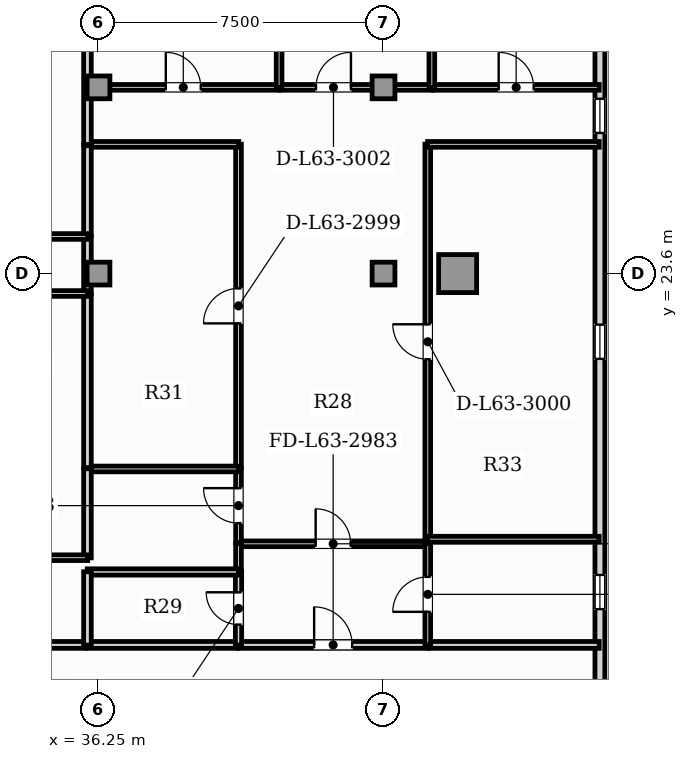
"""IFC4 building model, lengths in metres.
Left out: names, types, materials, properties, quantities, classifications, styles, units other than length and angle.
Written with IfcOpenShell. Run it as: python <this file> out.ifc"""

import sys

from ifc_helpers import new_model, si_unit, direction, frame, frame_2d, origin, origin_2d, place, context, subcontext, project, spatial, rectangle, hollow_rectangle, extrude, element, fill, save


model = new_model("IFC4")
c1 = context("Model", 3, precision=1e-05, world=origin(), true_north=direction((0.0, 1.0)))
c2 = subcontext(c1, "Body", "Model", "MODEL_VIEW")
j1 = project(units=[si_unit("LENGTHUNIT", "METRE"), si_unit("PLANEANGLEUNIT", "RADIAN")], contexts=[c1])
p1 = place(None, origin())
s1 = spatial("IfcSite", under=j1, at=p1, CompositionType="ELEMENT")
p2 = place(p1, origin())
s2 = spatial("IfcBuilding", under=s1, at=p2, CompositionType="ELEMENT")
p3 = place(p2, frame((0.0, 0.0, 256.75)))
s3 = spatial("IfcBuildingStorey", under=s2, at=p3, CompositionType="ELEMENT", Elevation=256.75)
p4 = place(p3, frame((45.7, 23.6, 0.0), z_axis=(0.0, 0.0, 1.0), x_axis=(1.0, 0.0, 0.0)))
e1 = element("IfcColumn", 1, at=p4, inside=s3, PredefinedType="USERDEFINED", context=c2, shape_type="SweptSolid", body=[
    extrude(hollow_rectangle(XDim=1.0, YDim=1.0, WallThickness=0.06, at=origin_2d()), origin(), (0.0, 0.0, 1.0), 3.85),
])
for number, where, z_axis, x_axis in (
    (2, (36.25, 23.6, 0.0), (0.0, 0.0, 1.0), (1.0, 0.0, 0.0)),
    (3, (43.75, 23.6, 0.0), (0.0, 0.0, 1.0), (1.0, 0.0, 0.0)),
    (4, (36.25, 28.5, 0.0), (0.0, 0.0, 1.0), (1.0, 0.0, 0.0)),
    (5, (43.75, 28.5, 0.0), (0.0, 0.0, 1.0), (1.0, 0.0, 0.0)),
):
    element("IfcColumn", number, at=place(p3, frame(where, z_axis=z_axis, x_axis=x_axis)), inside=s3, PredefinedType="COLUMN", context=c2, shape_type="SweptSolid", body=[
        extrude(rectangle(XDim=0.6, YDim=0.6, at=origin_2d()), origin(), (0.0, 0.0, 1.0), 3.85),
    ])
p5 = place(p3, frame((49.443, 3.24, 0.0), z_axis=(0.0, 0.0, 1.0), x_axis=(0.0, 1.0, 0.0)))
e6 = element("IfcWall", 6, at=p5, inside=s3, PredefinedType="SOLIDWALL", context=c2, shape_type="SweptSolid", body=[
    extrude(rectangle(XDim=29.486, YDim=0.26, at=frame_2d((14.743, 0.0))), origin(), (0.0, 0.0, 1.0), 3.19),
])
p6 = place(p5, frame((24.06, 0.0, 0.85)))
e7 = element("IfcOpeningElement", 7, at=p6, cuts=e6, PredefinedType="OPENING", context=c2, shape_type="SweptSolid", body=[
    extrude(rectangle(XDim=0.9, YDim=1.4, at=frame_2d((0.45, 0.7))), frame((0.0, 0.14, 0.0), z_axis=(0.0, -1.0, 0.0), x_axis=(1.0, 0.0, 0.0)), (0.0, 0.0, 1.0), 0.28),
])
p7 = place(p5, frame((11.531, 0.0, 0.85)))
e8 = element("IfcOpeningElement", 8, at=p7, cuts=e6, PredefinedType="OPENING", context=c2, shape_type="SweptSolid", body=[
    extrude(rectangle(XDim=0.9, YDim=1.4, at=frame_2d((0.45, 0.7))), frame((0.0, 0.14, 0.0), z_axis=(0.0, -1.0, 0.0), x_axis=(1.0, 0.0, 0.0)), (0.0, 0.0, 1.0), 0.28),
])
p8 = place(p5, frame((18.116, 0.0, 0.85)))
e9 = element("IfcOpeningElement", 9, at=p8, cuts=e6, PredefinedType="OPENING", context=c2, shape_type="SweptSolid", body=[
    extrude(rectangle(XDim=0.9, YDim=1.4, at=frame_2d((0.45, 0.7))), frame((0.0, 0.14, 0.0), z_axis=(0.0, -1.0, 0.0), x_axis=(1.0, 0.0, 0.0)), (0.0, 0.0, 1.0), 0.28),
])
p9 = place(p5, frame((26.258, 0.0, 0.85)))
e10 = element("IfcOpeningElement", 10, at=p9, cuts=e6, PredefinedType="OPENING", context=c2, shape_type="SweptSolid", body=[
    extrude(rectangle(XDim=0.9, YDim=1.4, at=frame_2d((0.45, 0.7))), frame((0.0, 0.14, 0.0), z_axis=(0.0, -1.0, 0.0), x_axis=(1.0, 0.0, 0.0)), (0.0, 0.0, 1.0), 0.28),
])
p10 = place(p3, frame((39.929, 13.83, 0.0), z_axis=(0.0, 0.0, 1.0), x_axis=(1.0, 0.0, 0.0)))
e11 = element("IfcWall", 11, at=p10, inside=s3, PredefinedType="PARTITIONING", context=c2, shape_type="SweptSolid", body=[
    extrude(rectangle(XDim=4.99, YDim=0.18, at=frame_2d((2.495, 0.0))), origin(), (0.0, 0.0, 1.0), 3.65),
])
p11 = place(p10, frame((1.995, 0.0, 0.0)))
e12 = element("IfcOpeningElement", 12, at=p11, cuts=e11, PredefinedType="OPENING", context=c2, shape_type="SweptSolid", body=[
    extrude(rectangle(XDim=1.0, YDim=2.15, at=frame_2d((0.5, 1.075))), frame((0.0, 0.1, 0.0), z_axis=(0.0, -1.0, 0.0), x_axis=(1.0, 0.0, 0.0)), (0.0, 0.0, 1.0), 0.2),
])
p12 = place(p3, frame((35.955, 13.83, 0.0), z_axis=(0.0, 0.0, 1.0), x_axis=(1.0, 0.0, 0.0)))
e13 = element("IfcWall", 13, at=p12, inside=s3, PredefinedType="PARTITIONING", context=c2, shape_type="SweptSolid", body=[
    extrude(rectangle(XDim=3.944, YDim=0.18, at=frame_2d((1.972, 0.0))), origin(), (0.0, 0.0, 1.0), 3.65),
])
p13 = place(p3, frame((44.949, 13.83, 0.0), z_axis=(0.0, 0.0, 1.0), x_axis=(1.0, 0.0, 0.0)))
e14 = element("IfcWall", 14, at=p13, inside=s3, PredefinedType="PARTITIONING", context=c2, shape_type="SweptSolid", body=[
    extrude(rectangle(XDim=4.475, YDim=0.18, at=frame_2d((2.237, 0.0))), origin(), (0.0, 0.0, 1.0), 3.65),
])
p14 = place(p3, frame((31.275, 13.83, 0.0), z_axis=(0.0, 0.0, 1.0), x_axis=(1.0, 0.0, 0.0)))
e15 = element("IfcWall", 15, at=p14, inside=s3, PredefinedType="PARTITIONING", context=c2, shape_type="SweptSolid", body=[
    extrude(rectangle(XDim=4.65, YDim=0.18, at=frame_2d((2.325, 0.0))), origin(), (0.0, 0.0, 1.0), 3.65),
])
p15 = place(p3, frame((39.929, 16.49, 0.0), z_axis=(0.0, 0.0, 1.0), x_axis=(1.0, 0.0, 0.0)))
e16 = element("IfcWall", 16, at=p15, inside=s3, PredefinedType="PARTITIONING", context=c2, shape_type="SweptSolid", body=[
    extrude(rectangle(XDim=4.99, YDim=0.15, at=frame_2d((2.495, 0.0))), origin(), (0.0, 0.0, 1.0), 3.65),
])
p16 = place(p15, frame((2.035, 0.0, 0.0)))
e17 = element("IfcOpeningElement", 17, at=p16, cuts=e16, PredefinedType="OPENING", context=c2, shape_type="SweptSolid", body=[
    extrude(rectangle(XDim=0.92, YDim=2.1, at=frame_2d((0.46, 1.05))), frame((0.0, 0.085, 0.0), z_axis=(0.0, -1.0, 0.0), x_axis=(1.0, 0.0, 0.0)), (0.0, 0.0, 1.0), 0.17),
])
p17 = place(p3, frame((39.934, 13.825, 0.0), z_axis=(0.0, 0.0, 1.0), x_axis=(0.0, 1.0, 0.0)))
e18 = element("IfcWall", 18, at=p17, inside=s3, PredefinedType="PLUMBINGWALL", context=c2, shape_type="SweptSolid", body=[
    extrude(rectangle(XDim=1.929, YDim=0.165, at=frame_2d((0.965, 0.0))), origin(), (0.0, 0.0, 1.0), 3.65),
])
p18 = place(p17, frame((0.54, 0.0, 0.0)))
e19 = element("IfcOpeningElement", 19, at=p18, cuts=e18, PredefinedType="OPENING", context=c2, shape_type="SweptSolid", body=[
    extrude(rectangle(XDim=0.85, YDim=2.1, at=frame_2d((0.425, 1.05))), frame((0.0, 0.093, 0.0), z_axis=(0.0, -1.0, 0.0), x_axis=(1.0, 0.0, 0.0)), (0.0, 0.0, 1.0), 0.185),
])
p19 = place(p3, frame((39.934, 15.784, 0.0), z_axis=(0.0, 0.0, 1.0), x_axis=(0.0, 1.0, 0.0)))
e20 = element("IfcWall", 20, at=p19, inside=s3, PredefinedType="PARTITIONING", context=c2, shape_type="SweptSolid", body=[
    extrude(rectangle(XDim=0.711, YDim=0.15, at=frame_2d((0.355, 0.0))), origin(), (0.0, 0.0, 1.0), 3.65),
])
p20 = place(p3, frame((44.914, 13.825, 0.0), z_axis=(0.0, 0.0, 1.0), x_axis=(0.0, 1.0, 0.0)))
e21 = element("IfcWall", 21, at=p20, inside=s3, PredefinedType="PARTITIONING", context=c2, shape_type="SweptSolid", body=[
    extrude(rectangle(XDim=2.67, YDim=0.15, at=frame_2d((1.335, 0.0))), origin(), (0.0, 0.0, 1.0), 3.65),
])
p21 = place(p20, frame((0.875, 0.0, 0.0)))
e22 = element("IfcOpeningElement", 22, at=p21, cuts=e21, PredefinedType="OPENING", context=c2, shape_type="SweptSolid", body=[
    extrude(rectangle(XDim=0.92, YDim=2.1, at=frame_2d((0.46, 1.05))), frame((0.0, 0.085, 0.0), z_axis=(0.0, -1.0, 0.0), x_axis=(1.0, 0.0, 0.0)), (0.0, 0.0, 1.0), 0.17),
])
p22 = place(p3, frame((39.934, 16.525, 0.0), z_axis=(0.0, 0.0, 1.0), x_axis=(0.0, 1.0, 0.0)))
e23 = element("IfcWall", 23, at=p22, inside=s3, PredefinedType="PARTITIONING", context=c2, shape_type="SweptSolid", body=[
    extrude(rectangle(XDim=1.939, YDim=0.15, at=frame_2d((0.97, 0.0))), origin(), (0.0, 0.0, 1.0), 3.65),
])
p23 = place(p22, frame((0.51, 0.0, 0.0)))
e24 = element("IfcOpeningElement", 24, at=p23, cuts=e23, PredefinedType="OPENING", context=c2, shape_type="SweptSolid", body=[
    extrude(rectangle(XDim=0.92, YDim=2.1, at=frame_2d((0.46, 1.05))), frame((0.0, 0.085, 0.0), z_axis=(0.0, -1.0, 0.0), x_axis=(1.0, 0.0, 0.0)), (0.0, 0.0, 1.0), 0.17),
])
p24 = place(p3, frame((39.934, 18.495, 0.0), z_axis=(0.0, 0.0, 1.0), x_axis=(0.0, 1.0, 0.0)))
e25 = element("IfcWall", 25, at=p24, inside=s3, PredefinedType="PARTITIONING", context=c2, shape_type="SweptSolid", body=[
    extrude(rectangle(XDim=8.51, YDim=0.15, at=frame_2d((4.255, 0.0))), origin(), (0.0, 0.0, 1.0), 3.65),
])
p25 = place(p24, frame((3.795, 0.0, 0.0)))
e26 = element("IfcOpeningElement", 26, at=p25, cuts=e25, PredefinedType="OPENING", context=c2, shape_type="SweptSolid", body=[
    extrude(rectangle(XDim=0.92, YDim=2.1, at=frame_2d((0.46, 1.05))), frame((0.0, 0.085, 0.0), z_axis=(0.0, -1.0, 0.0), x_axis=(1.0, 0.0, 0.0)), (0.0, 0.0, 1.0), 0.17),
])
p26 = place(p3, frame((35.955, 27.0, 0.0), z_axis=(0.0, 0.0, 1.0), x_axis=(1.0, 0.0, 0.0)))
e27 = element("IfcWall", 27, at=p26, inside=s3, PredefinedType="PARTITIONING", context=c2, shape_type="SweptSolid", body=[
    extrude(rectangle(XDim=3.984, YDim=0.15, at=frame_2d((1.992, 0.0))), origin(), (0.0, 0.0, 1.0), 3.65),
])
p27 = place(p3, frame((44.914, 16.607, 0.0), z_axis=(0.0, 0.0, 1.0), x_axis=(0.0, 1.0, 0.0)))
e28 = element("IfcWall", 28, at=p27, inside=s3, PredefinedType="PARTITIONING", context=c2, shape_type="SweptSolid", body=[
    extrude(rectangle(XDim=10.397, YDim=0.15, at=frame_2d((5.199, 0.0))), origin(), (0.0, 0.0, 1.0), 3.65),
])
p28 = place(p27, frame((4.739, 0.0, 0.0)))
e29 = element("IfcOpeningElement", 29, at=p28, cuts=e28, PredefinedType="OPENING", context=c2, shape_type="SweptSolid", body=[
    extrude(rectangle(XDim=0.92, YDim=2.1, at=frame_2d((0.46, 1.05))), frame((0.0, 0.085, 0.0), z_axis=(0.0, -1.0, 0.0), x_axis=(1.0, 0.0, 0.0)), (0.0, 0.0, 1.0), 0.17),
])
p29 = place(p3, frame((44.909, 27.0, 0.0), z_axis=(0.0, 0.0, 1.0), x_axis=(1.0, 0.0, 0.0)))
e30 = element("IfcWall", 30, at=p29, inside=s3, PredefinedType="PARTITIONING", context=c2, shape_type="SweptSolid", body=[
    extrude(rectangle(XDim=4.515, YDim=0.15, at=frame_2d((2.257, 0.0))), origin(), (0.0, 0.0, 1.0), 3.65),
])
p30 = place(p3, frame((35.955, 28.5, 0.0), z_axis=(0.0, 0.0, 1.0), x_axis=(1.0, 0.0, 0.0)))
e31 = element("IfcWall", 31, at=p30, inside=s3, PredefinedType="PARTITIONING", context=c2, shape_type="SweptSolid", body=[
    extrude(rectangle(XDim=5.052, YDim=0.15, at=frame_2d((2.526, 0.0))), origin(), (0.0, 0.0, 1.0), 3.105),
])
p31 = place(p30, frame((2.066, 0.0, 0.0)))
e32 = element("IfcOpeningElement", 32, at=p31, cuts=e31, PredefinedType="OPENING", context=c2, shape_type="SweptSolid", body=[
    extrude(rectangle(XDim=0.92, YDim=2.1, at=frame_2d((0.46, 1.05))), frame((0.0, 0.085, 0.0), z_axis=(0.0, -1.0, 0.0), x_axis=(1.0, 0.0, 0.0)), (0.0, 0.0, 1.0), 0.17),
])
p32 = place(p3, frame((41.037, 28.5, 0.0), z_axis=(0.0, 0.0, 1.0), x_axis=(1.0, 0.0, 0.0)))
e33 = element("IfcWall", 33, at=p32, inside=s3, PredefinedType="PARTITIONING", context=c2, shape_type="SweptSolid", body=[
    extrude(rectangle(XDim=3.989, YDim=0.15, at=frame_2d((1.994, 0.0))), origin(), (0.0, 0.0, 1.0), 3.105),
])
p33 = place(p32, frame((0.936, 0.0, 0.0)))
e34 = element("IfcOpeningElement", 34, at=p33, cuts=e33, PredefinedType="OPENING", context=c2, shape_type="SweptSolid", body=[
    extrude(rectangle(XDim=0.92, YDim=2.1, at=frame_2d((0.46, 1.05))), frame((0.0, 0.085, 0.0), z_axis=(0.0, -1.0, 0.0), x_axis=(1.0, 0.0, 0.0)), (0.0, 0.0, 1.0), 0.17),
])
p34 = place(p3, frame((45.056, 28.5, 0.0), z_axis=(0.0, 0.0, 1.0), x_axis=(1.0, 0.0, 0.0)))
e35 = element("IfcWall", 35, at=p34, inside=s3, PredefinedType="PARTITIONING", context=c2, shape_type="SweptSolid", body=[
    extrude(rectangle(XDim=4.368, YDim=0.15, at=frame_2d((2.184, 0.0))), origin(), (0.0, 0.0, 1.0), 3.65),
])
p35 = place(p34, frame((1.724, 0.0, 0.0)))
e36 = element("IfcOpeningElement", 36, at=p35, cuts=e35, PredefinedType="OPENING", context=c2, shape_type="SweptSolid", body=[
    extrude(rectangle(XDim=0.92, YDim=2.1, at=frame_2d((0.46, 1.05))), frame((0.0, 0.085, 0.0), z_axis=(0.0, -1.0, 0.0), x_axis=(1.0, 0.0, 0.0)), (0.0, 0.0, 1.0), 0.17),
])
p36 = place(p3, frame((35.96, 26.995, 0.0), z_axis=(0.0, 0.0, 1.0), x_axis=(0.0, 1.0, 0.0)))
e37 = element("IfcWall", 37, at=p36, inside=s3, PredefinedType="PARTITIONING", context=c2, shape_type="SweptSolid", body=[
    extrude(rectangle(XDim=2.622, YDim=0.2, at=frame_2d((1.311, 0.0))), origin(), (0.0, 0.0, 1.0), 3.65),
])
p37 = place(p3, frame((35.955, 15.75, 0.0), z_axis=(0.0, 0.0, 1.0), x_axis=(1.0, 0.0, 0.0)))
e38 = element("IfcWall", 38, at=p37, inside=s3, PredefinedType="PLUMBINGWALL", context=c2, shape_type="SweptSolid", body=[
    extrude(rectangle(XDim=3.984, YDim=0.165, at=frame_2d((1.992, 0.0))), origin(), (0.0, 0.0, 1.0), 3.65),
])
p38 = place(p3, frame((35.96, 13.825, 0.0), z_axis=(0.0, 0.0, 1.0), x_axis=(0.0, 1.0, 0.0)))
e39 = element("IfcWall", 39, at=p38, inside=s3, PredefinedType="PARTITIONING", context=c2, shape_type="SweptSolid", body=[
    extrude(rectangle(XDim=1.929, YDim=0.2, at=frame_2d((0.965, 0.0))), origin(), (0.0, 0.0, 1.0), 3.65),
])
p39 = place(p3, frame((35.955, 18.46, 0.0), z_axis=(0.0, 0.0, 1.0), x_axis=(1.0, 0.0, 0.0)))
e40 = element("IfcWall", 40, at=p39, inside=s3, PredefinedType="PARTITIONING", context=c2, shape_type="SweptSolid", body=[
    extrude(rectangle(XDim=3.984, YDim=0.15, at=frame_2d((1.992, 0.0))), origin(), (0.0, 0.0, 1.0), 3.65),
])
p40 = place(p3, frame((35.96, 16.119, 0.0), z_axis=(0.0, 0.0, 1.0), x_axis=(0.0, 1.0, 0.0)))
e41 = element("IfcWall", 41, at=p40, inside=s3, PredefinedType="PARTITIONING", context=c2, shape_type="SweptSolid", body=[
    extrude(rectangle(XDim=2.345, YDim=0.2, at=frame_2d((1.173, 0.0))), origin(), (0.0, 0.0, 1.0), 3.65),
])
p41 = place(p3, frame((35.96, 23.071, 0.0), z_axis=(0.0, 0.0, 1.0), x_axis=(0.0, 1.0, 0.0)))
e42 = element("IfcWall", 42, at=p41, inside=s3, PredefinedType="PARTITIONING", context=c2, shape_type="SweptSolid", body=[
    extrude(rectangle(XDim=1.51, YDim=0.2, at=frame_2d((0.755, 0.0))), origin(), (0.0, 0.0, 1.0), 3.65),
])
p42 = place(p3, frame((35.96, 18.495, 0.0), z_axis=(0.0, 0.0, 1.0), x_axis=(0.0, 1.0, 0.0)))
e43 = element("IfcWall", 43, at=p42, inside=s3, PredefinedType="PARTITIONING", context=c2, shape_type="SweptSolid", body=[
    extrude(rectangle(XDim=4.547, YDim=0.2, at=frame_2d((2.273, 0.0))), origin(), (0.0, 0.0, 1.0), 3.65),
])
p43 = place(p3, frame((35.96, 24.611, 0.0), z_axis=(0.0, 0.0, 1.0), x_axis=(0.0, 1.0, 0.0)))
e44 = element("IfcWall", 44, at=p43, inside=s3, PredefinedType="PARTITIONING", context=c2, shape_type="SweptSolid", body=[
    extrude(rectangle(XDim=2.354, YDim=0.2, at=frame_2d((1.177, 0.0))), origin(), (0.0, 0.0, 1.0), 3.65),
])
p44 = place(p3, frame((44.909, 16.612, 0.0), z_axis=(0.0, 0.0, 1.0), x_axis=(1.0, 0.0, 0.0)))
e45 = element("IfcWall", 45, at=p44, inside=s3, PredefinedType="PARTITIONING", context=c2, shape_type="SweptSolid", body=[
    extrude(rectangle(XDim=4.515, YDim=0.15, at=frame_2d((2.257, 0.0))), origin(), (0.0, 0.0, 1.0), 3.65),
])
for number, where, z_axis, x_axis in (
    (46, (41.002, 28.495, 0.0), (0.0, 0.0, 1.0), (0.0, 1.0, 0.0)),
    (47, (45.021, 28.495, 0.0), (0.0, 0.0, 1.0), (0.0, 1.0, 0.0)),
):
    element("IfcWall", number, at=place(p3, frame(where, z_axis=z_axis, x_axis=x_axis)), inside=s3, PredefinedType="PARTITIONING", context=c2, shape_type="SweptSolid", body=[
        extrude(rectangle(XDim=7.322, YDim=0.15, at=frame_2d((3.661, 0.0))), origin(), (0.0, 0.0, 1.0), 3.65),
    ])
p45 = place(p3, frame((31.235, 23.076, 0.0), z_axis=(0.0, 0.0, 1.0), x_axis=(1.0, 0.0, 0.0)))
e48 = element("IfcWall", 48, at=p45, inside=s3, PredefinedType="PARTITIONING", context=c2, shape_type="SweptSolid", body=[
    extrude(rectangle(XDim=4.73, YDim=0.15, at=frame_2d((2.365, 0.0))), origin(), (0.0, 0.0, 1.0), 3.65),
])
p46 = place(p3, frame((28.785, 24.576, 0.0), z_axis=(0.0, 0.0, 1.0), x_axis=(1.0, 0.0, 0.0)))
e49 = element("IfcWall", 49, at=p46, inside=s3, PredefinedType="PARTITIONING", context=c2, shape_type="SweptSolid", body=[
    extrude(rectangle(XDim=7.18, YDim=0.15, at=frame_2d((3.59, 0.0))), origin(), (0.0, 0.0, 1.0), 3.65),
])
p47 = place(p46, frame((3.13, 0.0, 0.0)))
e50 = element("IfcOpeningElement", 50, at=p47, cuts=e49, PredefinedType="OPENING", context=c2, shape_type="SweptSolid", body=[
    extrude(rectangle(XDim=0.92, YDim=2.1, at=frame_2d((0.46, 1.05))), frame((0.0, 0.085, 0.0), z_axis=(0.0, -1.0, 0.0), x_axis=(1.0, 0.0, 0.0)), (0.0, 0.0, 1.0), 0.17),
])
p48 = place(p3, frame((31.235, 16.125, 0.0), z_axis=(0.0, 0.0, 1.0), x_axis=(1.0, 0.0, 0.0)))
e51 = element("IfcWall", 51, at=p48, inside=s3, PredefinedType="PARTITIONING", context=c2, shape_type="SweptSolid", body=[
    extrude(rectangle(XDim=4.73, YDim=0.15, at=frame_2d((2.365, 0.0))), origin(), (0.0, 0.0, 1.0), 3.65),
])
p49 = place(p6, origin())
e52 = element("IfcWindow", 52, at=p49, inside=s3, PartitioningType="SINGLE_PANEL", PredefinedType="WINDOW", context=c2, shape_type="SweptSolid", body=[
    extrude(rectangle(XDim=0.9, YDim=1.4, at=frame_2d((0.45, 0.7))), frame((0.0, 0.03, 0.0), z_axis=(0.0, -1.0, 0.0), x_axis=(1.0, 0.0, 0.0)), (0.0, 0.0, 1.0), 0.06),
])
fill(e7, e52)
p50 = place(p7, origin())
e53 = element("IfcWindow", 53, at=p50, inside=s3, PartitioningType="SINGLE_PANEL", PredefinedType="WINDOW", context=c2, shape_type="SweptSolid", body=[
    extrude(rectangle(XDim=0.9, YDim=1.4, at=frame_2d((0.45, 0.7))), frame((0.0, 0.03, 0.0), z_axis=(0.0, -1.0, 0.0), x_axis=(1.0, 0.0, 0.0)), (0.0, 0.0, 1.0), 0.06),
])
fill(e8, e53)
p51 = place(p8, origin())
e54 = element("IfcWindow", 54, at=p51, inside=s3, PartitioningType="SINGLE_PANEL", PredefinedType="WINDOW", context=c2, shape_type="SweptSolid", body=[
    extrude(rectangle(XDim=0.9, YDim=1.4, at=frame_2d((0.45, 0.7))), frame((0.0, 0.03, 0.0), z_axis=(0.0, -1.0, 0.0), x_axis=(1.0, 0.0, 0.0)), (0.0, 0.0, 1.0), 0.06),
])
fill(e9, e54)
p52 = place(p11, origin())
e55 = element("IfcDoor", 55, at=p52, inside=s3, OperationType="SINGLE_SWING_LEFT", PredefinedType="DOOR", context=c2, shape_type="SweptSolid", body=[
    extrude(rectangle(XDim=1.0, YDim=2.15, at=frame_2d((0.5, 1.075))), frame((0.0, 0.025, 0.0), z_axis=(0.0, -1.0, 0.0), x_axis=(1.0, 0.0, 0.0)), (0.0, 0.0, 1.0), 0.05),
])
fill(e12, e55)
p53 = place(p16, origin())
e56 = element("IfcDoor", 56, at=p53, inside=s3, OperationType="SINGLE_SWING_LEFT", PredefinedType="DOOR", context=c2, shape_type="SweptSolid", body=[
    extrude(rectangle(XDim=0.92, YDim=2.1, at=frame_2d((0.46, 1.05))), frame((0.0, 0.025, 0.0), z_axis=(0.0, -1.0, 0.0), x_axis=(1.0, 0.0, 0.0)), (0.0, 0.0, 1.0), 0.05),
])
fill(e17, e56)
p54 = place(p18, origin())
e57 = element("IfcDoor", 57, at=p54, inside=s3, OperationType="SINGLE_SWING_RIGHT", PredefinedType="DOOR", context=c2, shape_type="SweptSolid", body=[
    extrude(rectangle(XDim=0.85, YDim=2.1, at=frame_2d((0.425, 1.05))), frame((0.0, 0.025, 0.0), z_axis=(0.0, -1.0, 0.0), x_axis=(1.0, 0.0, 0.0)), (0.0, 0.0, 1.0), 0.05),
])
fill(e19, e57)
p55 = place(p21, origin())
e58 = element("IfcDoor", 58, at=p55, inside=s3, OperationType="SINGLE_SWING_LEFT", PredefinedType="DOOR", context=c2, shape_type="SweptSolid", body=[
    extrude(rectangle(XDim=0.92, YDim=2.1, at=frame_2d((0.46, 1.05))), frame((0.0, 0.025, 0.0), z_axis=(0.0, -1.0, 0.0), x_axis=(1.0, 0.0, 0.0)), (0.0, 0.0, 1.0), 0.05),
])
fill(e22, e58)
p56 = place(p23, origin())
e59 = element("IfcDoor", 59, at=p56, inside=s3, OperationType="SINGLE_SWING_RIGHT", PredefinedType="DOOR", context=c2, shape_type="SweptSolid", body=[
    extrude(rectangle(XDim=0.92, YDim=2.1, at=frame_2d((0.46, 1.05))), frame((0.0, 0.025, 0.0), z_axis=(0.0, -1.0, 0.0), x_axis=(1.0, 0.0, 0.0)), (0.0, 0.0, 1.0), 0.05),
])
fill(e24, e59)
p57 = place(p25, origin())
e60 = element("IfcDoor", 60, at=p57, inside=s3, OperationType="SINGLE_SWING_LEFT", PredefinedType="DOOR", context=c2, shape_type="SweptSolid", body=[
    extrude(rectangle(XDim=0.92, YDim=2.1, at=frame_2d((0.46, 1.05))), frame((0.0, 0.025, 0.0), z_axis=(0.0, -1.0, 0.0), x_axis=(1.0, 0.0, 0.0)), (0.0, 0.0, 1.0), 0.05),
])
fill(e26, e60)
p58 = place(p28, origin())
e61 = element("IfcDoor", 61, at=p58, inside=s3, OperationType="SINGLE_SWING_RIGHT", PredefinedType="DOOR", context=c2, shape_type="SweptSolid", body=[
    extrude(rectangle(XDim=0.92, YDim=2.1, at=frame_2d((0.46, 1.05))), frame((0.0, 0.025, 0.0), z_axis=(0.0, -1.0, 0.0), x_axis=(1.0, 0.0, 0.0)), (0.0, 0.0, 1.0), 0.05),
])
fill(e29, e61)
p59 = place(p31, origin())
e62 = element("IfcDoor", 62, at=p59, inside=s3, OperationType="SINGLE_SWING_LEFT", PredefinedType="DOOR", context=c2, shape_type="SweptSolid", body=[
    extrude(rectangle(XDim=0.92, YDim=2.1, at=frame_2d((0.46, 1.05))), frame((0.0, 0.025, 0.0), z_axis=(0.0, -1.0, 0.0), x_axis=(1.0, 0.0, 0.0)), (0.0, 0.0, 1.0), 0.05),
])
fill(e32, e62)
p60 = place(p33, origin())
e63 = element("IfcDoor", 63, at=p60, inside=s3, OperationType="SINGLE_SWING_RIGHT", PredefinedType="DOOR", context=c2, shape_type="SweptSolid", body=[
    extrude(rectangle(XDim=0.92, YDim=2.1, at=frame_2d((0.46, 1.05))), frame((0.0, 0.025, 0.0), z_axis=(0.0, -1.0, 0.0), x_axis=(1.0, 0.0, 0.0)), (0.0, 0.0, 1.0), 0.05),
])
fill(e34, e63)
p61 = place(p35, origin())
e64 = element("IfcDoor", 64, at=p61, inside=s3, OperationType="SINGLE_SWING_LEFT", PredefinedType="DOOR", context=c2, shape_type="SweptSolid", body=[
    extrude(rectangle(XDim=0.92, YDim=2.1, at=frame_2d((0.46, 1.05))), frame((0.0, 0.025, 0.0), z_axis=(0.0, -1.0, 0.0), x_axis=(1.0, 0.0, 0.0)), (0.0, 0.0, 1.0), 0.05),
])
fill(e36, e64)
save(model, sys.argv[1])
